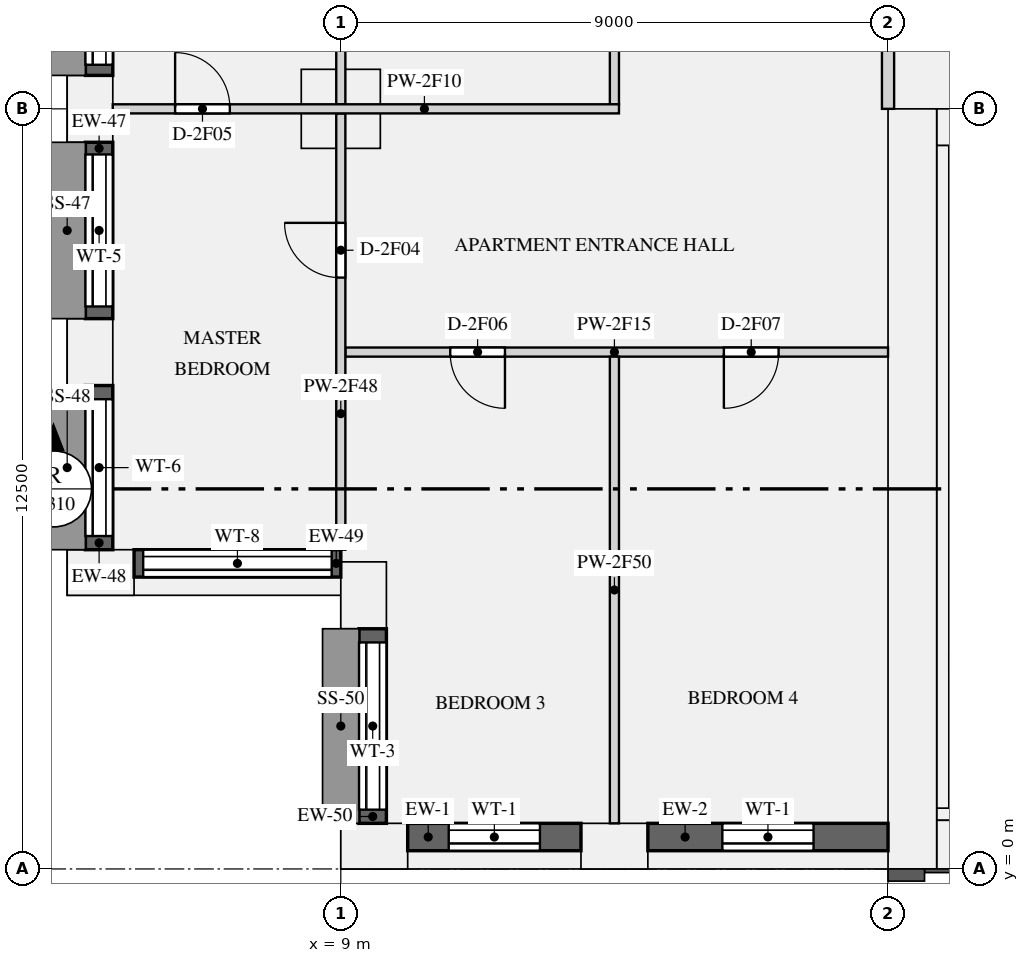
"""IFC4 building model, lengths in metres.
Left out: names, types, materials, properties, quantities, classifications, styles, units other than length and angle.
Written with IfcOpenShell. Run it as: python <this file> out.ifc"""

import sys

from ifc_helpers import new_model, si_unit, direction, frame, frame_2d, origin, origin_2d, place, context, subcontext, project, spatial, rectangle, extrude, element, fill, save


model = new_model("IFC4")
c1 = context("Model", 3, precision=1e-05, world=origin(), true_north=direction((0.0, 1.0)))
c2 = subcontext(c1, "Body", "Model", "MODEL_VIEW")
j1 = project(units=[si_unit("LENGTHUNIT", "METRE"), si_unit("PLANEANGLEUNIT", "RADIAN")], contexts=[c1])
p1 = place(None, origin())
s1 = spatial("IfcSite", under=j1, at=p1, CompositionType="ELEMENT")
p2 = place(p1, origin())
s2 = spatial("IfcBuilding", under=s1, at=p2, CompositionType="ELEMENT")
p3 = place(p2, frame((0.0, 0.0, 127.65)))
s3 = spatial("IfcBuildingStorey", under=s2, at=p3, CompositionType="ELEMENT", Elevation=127.65)
for number, where, z_axis, x_axis in (
    (1, (9.55, 0.375, 0.0), (0.0, 0.0, 1.0), (1.0, 0.0, 0.0)),
    (2, (13.5, 0.375, 0.0), (0.0, 0.0, 1.0), (1.0, 0.0, 0.0)),
    (3, (4.875, 12.5, 0.0), (0.0, 0.0, 1.0), (0.0, -1.0, 0.0)),
    (4, (4.875, 8.5, 0.0), (0.0, 0.0, 1.0), (0.0, -1.0, 0.0)),
    (5, (5.05, 4.875, 0.0), (0.0, 0.0, 1.0), (1.0, 0.0, 0.0)),
    (6, (9.375, 4.5, 0.0), (0.0, 0.0, 1.0), (0.0, -1.0, 0.0)),
):
    element("IfcColumn", number, at=place(p3, frame(where, z_axis=z_axis, x_axis=x_axis)), inside=s3, PredefinedType="USERDEFINED", context=c2, shape_type="SweptSolid", body=[
        extrude(rectangle(XDim=1.1, YDim=0.75, at=origin_2d()), origin(), (0.0, 0.0, 1.0), 3.15),
    ])
p4 = place(p3, frame((9.0, 12.5, 0.0), z_axis=(0.0, 0.0, 1.0), x_axis=(1.0, 0.0, 0.0)))
e7 = element("IfcColumn", 7, at=p4, inside=s3, PredefinedType="COLUMN", context=c2, shape_type="SweptSolid", body=[
    extrude(rectangle(XDim=1.3, YDim=1.3, at=origin_2d()), origin(), (0.0, 0.0, 1.0), 3.15),
])
p5 = place(p3, frame((18.4, 0.0, 0.0), z_axis=(0.0, 0.0, 1.0), x_axis=(0.0, 1.0, 0.0)))
e8 = element("IfcWall", 8, at=p5, inside=s3, PredefinedType="SHEAR", context=c2, shape_type="SweptSolid", body=[
    extrude(rectangle(XDim=12.5, YDim=0.8, at=frame_2d((6.25, 0.0))), origin(), (0.0, 0.0, 1.0), 3.15),
])
p6 = place(p3, frame((18.8, 0.4, 0.0), z_axis=(0.0, 0.0, 1.0), x_axis=(1.0, 0.0, 0.0)))
e9 = element("IfcWall", 9, at=p6, inside=s3, PredefinedType="SHEAR", context=c2, shape_type="SweptSolid", body=[
    extrude(rectangle(XDim=34.4, YDim=0.8, at=frame_2d((17.2, 0.0))), origin(), (0.0, 0.0, 1.0), 3.15),
])
p7 = place(p3, frame((18.8, 12.2, 0.0), z_axis=(0.0, 0.0, 1.0), x_axis=(1.0, 0.0, 0.0)))
e10 = element("IfcWall", 10, at=p7, inside=s3, PredefinedType="SHEAR", context=c2, shape_type="SweptSolid", body=[
    extrude(rectangle(XDim=34.4, YDim=0.6, at=frame_2d((17.2, 0.0))), origin(), (0.0, 0.0, 1.0), 3.15),
])
p8 = place(p7, frame((24.375, 0.0, 0.0)))
e11 = element("IfcOpeningElement", 11, at=p8, cuts=e10, PredefinedType="OPENING", context=c2, shape_type="SweptSolid", body=[
    extrude(rectangle(XDim=1.1, YDim=2.1, at=frame_2d((0.55, 1.05))), frame((0.0, 0.31, 0.0), z_axis=(0.0, -1.0, 0.0), x_axis=(1.0, 0.0, 0.0)), (0.0, 0.0, 1.0), 0.62),
])
p9 = place(p7, frame((26.625, 0.0, 0.0)))
e12 = element("IfcOpeningElement", 12, at=p9, cuts=e10, PredefinedType="OPENING", context=c2, shape_type="SweptSolid", body=[
    extrude(rectangle(XDim=1.1, YDim=2.1, at=frame_2d((0.55, 1.05))), frame((0.0, 0.31, 0.0), z_axis=(0.0, -1.0, 0.0), x_axis=(1.0, 0.0, 0.0)), (0.0, 0.0, 1.0), 0.62),
])
p10 = place(p7, frame((28.875, 0.0, 0.0)))
e13 = element("IfcOpeningElement", 13, at=p10, cuts=e10, PredefinedType="OPENING", context=c2, shape_type="SweptSolid", body=[
    extrude(rectangle(XDim=1.1, YDim=2.1, at=frame_2d((0.55, 1.05))), frame((0.0, 0.31, 0.0), z_axis=(0.0, -1.0, 0.0), x_axis=(1.0, 0.0, 0.0)), (0.0, 0.0, 1.0), 0.62),
])
p11 = place(p7, frame((4.75, 0.0, 0.0)))
e14 = element("IfcOpeningElement", 14, at=p11, cuts=e10, PredefinedType="OPENING", context=c2, shape_type="SweptSolid", body=[
    extrude(rectangle(XDim=0.9, YDim=2.1, at=frame_2d((0.45, 1.05))), frame((0.0, 0.31, 0.0), z_axis=(0.0, -1.0, 0.0), x_axis=(1.0, 0.0, 0.0)), (0.0, 0.0, 1.0), 0.62),
])
p12 = place(p7, frame((11.75, 0.0, 0.0)))
e15 = element("IfcOpeningElement", 15, at=p12, cuts=e10, PredefinedType="OPENING", context=c2, shape_type="SweptSolid", body=[
    extrude(rectangle(XDim=0.9, YDim=2.1, at=frame_2d((0.45, 1.05))), frame((0.0, 0.31, 0.0), z_axis=(0.0, -1.0, 0.0), x_axis=(1.0, 0.0, 0.0)), (0.0, 0.0, 1.0), 0.62),
])
p13 = place(p7, frame((18.25, 0.0, 0.0)))
e16 = element("IfcOpeningElement", 16, at=p13, cuts=e10, PredefinedType="OPENING", context=c2, shape_type="SweptSolid", body=[
    extrude(rectangle(XDim=0.9, YDim=2.1, at=frame_2d((0.45, 1.05))), frame((0.0, 0.31, 0.0), z_axis=(0.0, -1.0, 0.0), x_axis=(1.0, 0.0, 0.0)), (0.0, 0.0, 1.0), 0.62),
])
p14 = place(p7, frame((1.35, 0.0, 0.0)))
e17 = element("IfcOpeningElement", 17, at=p14, cuts=e10, PredefinedType="OPENING", context=c2, shape_type="SweptSolid", body=[
    extrude(rectangle(XDim=1.2, YDim=2.1, at=frame_2d((0.6, 1.05))), frame((0.0, 0.31, 0.0), z_axis=(0.0, -1.0, 0.0), x_axis=(1.0, 0.0, 0.0)), (0.0, 0.0, 1.0), 0.62),
])
p15 = place(p7, frame((31.85, 0.0, 0.0)))
e18 = element("IfcOpeningElement", 18, at=p15, cuts=e10, PredefinedType="OPENING", context=c2, shape_type="SweptSolid", body=[
    extrude(rectangle(XDim=1.2, YDim=2.1, at=frame_2d((0.6, 1.05))), frame((0.0, 0.31, 0.0), z_axis=(0.0, -1.0, 0.0), x_axis=(1.0, 0.0, 0.0)), (0.0, 0.0, 1.0), 0.62),
])
p16 = place(p3, frame((18.9, 1.0, 0.0), z_axis=(0.0, 0.0, 1.0), x_axis=(0.0, 1.0, 0.0)))
e19 = element("IfcWall", 19, at=p16, inside=s3, PredefinedType="SHEAR", context=c2, shape_type="SweptSolid", body=[
    extrude(rectangle(XDim=10.9, YDim=0.2, at=frame_2d((5.45, 0.0))), origin(), (0.0, 0.0, 1.0), 3.15),
])
p17 = place(p3, frame((18.8, 0.9, 0.0), z_axis=(0.0, 0.0, 1.0), x_axis=(1.0, 0.0, 0.0)))
e20 = element("IfcWall", 20, at=p17, inside=s3, PredefinedType="SHEAR", context=c2, shape_type="SweptSolid", body=[
    extrude(rectangle(XDim=34.4, YDim=0.2, at=frame_2d((17.2, 0.0))), origin(), (0.0, 0.0, 1.0), 3.15),
])
p18 = place(p3, frame((19.0, 3.4, 0.0), z_axis=(0.0, 0.0, 1.0), x_axis=(1.0, 0.0, 0.0)))
e21 = element("IfcWall", 21, at=p18, inside=s3, PredefinedType="SHEAR", context=c2, shape_type="SweptSolid", body=[
    extrude(rectangle(XDim=2.55, YDim=0.3, at=frame_2d((1.275, 0.0))), origin(), (0.0, 0.0, 1.0), 3.15),
])
p19 = place(p18, frame((0.675, 0.0, 0.0)))
e22 = element("IfcOpeningElement", 22, at=p19, cuts=e21, PredefinedType="OPENING", context=c2, shape_type="SweptSolid", body=[
    extrude(rectangle(XDim=1.2, YDim=2.1, at=frame_2d((0.6, 1.05))), frame((0.0, 0.16, 0.0), z_axis=(0.0, -1.0, 0.0), x_axis=(1.0, 0.0, 0.0)), (0.0, 0.0, 1.0), 0.32),
])
p20 = place(p3, frame((10.1, 0.525, 0.9), z_axis=(0.0, 0.0, 1.0), x_axis=(1.0, 0.0, 0.0)))
e23 = element("IfcWall", 23, at=p20, inside=s3, PredefinedType="SOLIDWALL", context=c2, shape_type="SweptSolid", body=[
    extrude(rectangle(XDim=2.85, YDim=0.45, at=frame_2d((1.425, 0.0))), origin(), (0.0, 0.0, 1.0), 1.75),
])
p21 = place(p20, frame((0.675, 0.0, 0.15)))
e24 = element("IfcOpeningElement", 24, at=p21, cuts=e23, PredefinedType="OPENING", context=c2, shape_type="SweptSolid", body=[
    extrude(rectangle(XDim=1.5, YDim=1.5, at=frame_2d((0.75, 0.75))), frame((0.0, 0.235, 0.0), z_axis=(0.0, -1.0, 0.0), x_axis=(1.0, 0.0, 0.0)), (0.0, 0.0, 1.0), 0.47),
])
p22 = place(p3, frame((14.05, 0.525, 0.9), z_axis=(0.0, 0.0, 1.0), x_axis=(1.0, 0.0, 0.0)))
e25 = element("IfcWall", 25, at=p22, inside=s3, PredefinedType="SOLIDWALL", context=c2, shape_type="SweptSolid", body=[
    extrude(rectangle(XDim=3.95, YDim=0.45, at=frame_2d((1.975, 0.0))), origin(), (0.0, 0.0, 1.0), 1.75),
])
p23 = place(p22, frame((1.225, 0.0, 0.15)))
e26 = element("IfcOpeningElement", 26, at=p23, cuts=e25, PredefinedType="OPENING", context=c2, shape_type="SweptSolid", body=[
    extrude(rectangle(XDim=1.5, YDim=1.5, at=frame_2d((0.75, 0.75))), frame((0.0, 0.235, 0.0), z_axis=(0.0, -1.0, 0.0), x_axis=(1.0, 0.0, 0.0)), (0.0, 0.0, 1.0), 0.47),
])
p24 = place(p3, frame((5.025, 15.4, 0.9), z_axis=(0.0, 0.0, 1.0), x_axis=(0.0, -1.0, 0.0)))
e27 = element("IfcWall", 27, at=p24, inside=s3, PredefinedType="SOLIDWALL", context=c2, shape_type="SweptSolid", body=[
    extrude(rectangle(XDim=2.35, YDim=0.45, at=frame_2d((1.175, 0.0))), origin(), (0.0, 0.0, 1.0), 1.75),
])
p25 = place(p24, frame((0.175, 0.0, 0.15)))
e28 = element("IfcOpeningElement", 28, at=p25, cuts=e27, PredefinedType="OPENING", context=c2, shape_type="SweptSolid", body=[
    extrude(rectangle(XDim=2.0, YDim=1.5, at=frame_2d((1.0, 0.75))), frame((0.0, 0.235, 0.0), z_axis=(0.0, -1.0, 0.0), x_axis=(1.0, 0.0, 0.0)), (0.0, 0.0, 1.0), 0.47),
])
p26 = place(p3, frame((5.025, 11.95, 0.9), z_axis=(0.0, 0.0, 1.0), x_axis=(0.0, -1.0, 0.0)))
e29 = element("IfcWall", 29, at=p26, inside=s3, PredefinedType="SOLIDWALL", context=c2, shape_type="SweptSolid", body=[
    extrude(rectangle(XDim=2.9, YDim=0.45, at=frame_2d((1.45, 0.0))), origin(), (0.0, 0.0, 1.0), 1.75),
])
p27 = place(p26, frame((0.2, 0.0, 0.15)))
e30 = element("IfcOpeningElement", 30, at=p27, cuts=e29, PredefinedType="OPENING", context=c2, shape_type="SweptSolid", body=[
    extrude(rectangle(XDim=2.5, YDim=1.5, at=frame_2d((1.25, 0.75))), frame((0.0, 0.235, 0.0), z_axis=(0.0, -1.0, 0.0), x_axis=(1.0, 0.0, 0.0)), (0.0, 0.0, 1.0), 0.47),
])
p28 = place(p3, frame((5.025, 7.95, 0.9), z_axis=(0.0, 0.0, 1.0), x_axis=(0.0, -1.0, 0.0)))
e31 = element("IfcWall", 31, at=p28, inside=s3, PredefinedType="SOLIDWALL", context=c2, shape_type="SweptSolid", body=[
    extrude(rectangle(XDim=2.7, YDim=0.45, at=frame_2d((1.35, 0.0))), origin(), (0.0, 0.0, 1.0), 1.75),
])
p29 = place(p28, frame((0.225, 0.0, 0.15)))
e32 = element("IfcOpeningElement", 32, at=p29, cuts=e31, PredefinedType="OPENING", context=c2, shape_type="SweptSolid", body=[
    extrude(rectangle(XDim=2.25, YDim=1.5, at=frame_2d((1.125, 0.75))), frame((0.0, 0.235, 0.0), z_axis=(0.0, -1.0, 0.0), x_axis=(1.0, 0.0, 0.0)), (0.0, 0.0, 1.0), 0.47),
])
p30 = place(p3, frame((5.6, 5.025, 0.9), z_axis=(0.0, 0.0, 1.0), x_axis=(1.0, 0.0, 0.0)))
e33 = element("IfcWall", 33, at=p30, inside=s3, PredefinedType="SOLIDWALL", context=c2, shape_type="SweptSolid", body=[
    extrude(rectangle(XDim=3.4, YDim=0.45, at=frame_2d((1.7, 0.0))), origin(), (0.0, 0.0, 1.0), 1.75),
])
p31 = place(p30, frame((0.15, 0.0, 0.15)))
e34 = element("IfcOpeningElement", 34, at=p31, cuts=e33, PredefinedType="OPENING", context=c2, shape_type="SweptSolid", body=[
    extrude(rectangle(XDim=3.1, YDim=1.5, at=frame_2d((1.55, 0.75))), frame((0.0, 0.235, 0.0), z_axis=(0.0, -1.0, 0.0), x_axis=(1.0, 0.0, 0.0)), (0.0, 0.0, 1.0), 0.47),
])
p32 = place(p3, frame((9.525, 3.95, 0.9), z_axis=(0.0, 0.0, 1.0), x_axis=(0.0, -1.0, 0.0)))
e35 = element("IfcWall", 35, at=p32, inside=s3, PredefinedType="SOLIDWALL", context=c2, shape_type="SweptSolid", body=[
    extrude(rectangle(XDim=3.2, YDim=0.45, at=frame_2d((1.6, 0.0))), origin(), (0.0, 0.0, 1.0), 1.75),
])
p33 = place(p32, frame((0.225, 0.0, 0.15)))
e36 = element("IfcOpeningElement", 36, at=p33, cuts=e35, PredefinedType="OPENING", context=c2, shape_type="SweptSolid", body=[
    extrude(rectangle(XDim=2.75, YDim=1.5, at=frame_2d((1.375, 0.75))), frame((0.0, 0.235, 0.0), z_axis=(0.0, -1.0, 0.0), x_axis=(1.0, 0.0, 0.0)), (0.0, 0.0, 1.0), 0.47),
])
p34 = place(p3, frame((18.0, 12.5, 0.0), z_axis=(0.0, 0.0, 1.0), x_axis=(0.0, 1.0, 0.0)))
e37 = element("IfcWall", 37, at=p34, inside=s3, PredefinedType="PARTITIONING", context=c2, shape_type="SweptSolid", body=[
    extrude(rectangle(XDim=3.4, YDim=0.2, at=frame_2d((1.7, 0.0))), origin(), (0.0, 0.0, 1.0), 2.65),
])
p35 = place(p3, frame((5.25, 12.5, 0.0), z_axis=(0.0, 0.0, 1.0), x_axis=(1.0, 0.0, 0.0)))
e38 = element("IfcWall", 38, at=p35, inside=s3, PredefinedType="PARTITIONING", context=c2, shape_type="SweptSolid", body=[
    extrude(rectangle(XDim=8.325, YDim=0.15, at=frame_2d((4.163, 0.0))), origin(), (0.0, 0.0, 1.0), 2.65),
])
p36 = place(p35, frame((1.025, 0.0, 0.0)))
e39 = element("IfcOpeningElement", 39, at=p36, cuts=e38, PredefinedType="OPENING", context=c2, shape_type="SweptSolid", body=[
    extrude(rectangle(XDim=0.9, YDim=2.1, at=frame_2d((0.45, 1.05))), frame((0.0, 0.085, 0.0), z_axis=(0.0, -1.0, 0.0), x_axis=(1.0, 0.0, 0.0)), (0.0, 0.0, 1.0), 0.17),
])
p37 = place(p3, frame((9.075, 8.5, 0.0), z_axis=(0.0, 0.0, 1.0), x_axis=(1.0, 0.0, 0.0)))
e40 = element("IfcWall", 40, at=p37, inside=s3, PredefinedType="PARTITIONING", context=c2, shape_type="SweptSolid", body=[
    extrude(rectangle(XDim=8.925, YDim=0.15, at=frame_2d((4.462, 0.0))), origin(), (0.0, 0.0, 1.0), 2.65),
])
p38 = place(p37, frame((1.725, 0.0, 0.0)))
e41 = element("IfcOpeningElement", 41, at=p38, cuts=e40, PredefinedType="OPENING", context=c2, shape_type="SweptSolid", body=[
    extrude(rectangle(XDim=0.9, YDim=2.1, at=frame_2d((0.45, 1.05))), frame((0.0, 0.085, 0.0), z_axis=(0.0, -1.0, 0.0), x_axis=(1.0, 0.0, 0.0)), (0.0, 0.0, 1.0), 0.17),
])
p39 = place(p37, frame((6.225, 0.0, 0.0)))
e42 = element("IfcOpeningElement", 42, at=p39, cuts=e40, PredefinedType="OPENING", context=c2, shape_type="SweptSolid", body=[
    extrude(rectangle(XDim=0.9, YDim=2.1, at=frame_2d((0.45, 1.05))), frame((0.0, 0.085, 0.0), z_axis=(0.0, -1.0, 0.0), x_axis=(1.0, 0.0, 0.0)), (0.0, 0.0, 1.0), 0.17),
])
p40 = place(p3, frame((9.0, 5.25, 0.0), z_axis=(0.0, 0.0, 1.0), x_axis=(0.0, 1.0, 0.0)))
e43 = element("IfcWall", 43, at=p40, inside=s3, PredefinedType="PARTITIONING", context=c2, shape_type="SweptSolid", body=[
    extrude(rectangle(XDim=7.175, YDim=0.15, at=frame_2d((3.587, 0.0))), origin(), (0.0, 0.0, 1.0), 2.65),
])
p41 = place(p40, frame((4.475, 0.0, 0.0)))
e44 = element("IfcOpeningElement", 44, at=p41, cuts=e43, PredefinedType="OPENING", context=c2, shape_type="SweptSolid", body=[
    extrude(rectangle(XDim=0.9, YDim=2.1, at=frame_2d((0.45, 1.05))), frame((0.0, 0.085, 0.0), z_axis=(0.0, -1.0, 0.0), x_axis=(1.0, 0.0, 0.0)), (0.0, 0.0, 1.0), 0.17),
])
p42 = place(p3, frame((9.0, 12.575, 0.0), z_axis=(0.0, 0.0, 1.0), x_axis=(0.0, 1.0, 0.0)))
e45 = element("IfcWall", 45, at=p42, inside=s3, PredefinedType="PARTITIONING", context=c2, shape_type="SweptSolid", body=[
    extrude(rectangle(XDim=3.85, YDim=0.15, at=frame_2d((1.925, 0.0))), origin(), (0.0, 0.0, 1.0), 2.65),
])
p43 = place(p3, frame((13.5, 0.75, 0.0), z_axis=(0.0, 0.0, 1.0), x_axis=(0.0, 1.0, 0.0)))
e46 = element("IfcWall", 46, at=p43, inside=s3, PredefinedType="PARTITIONING", context=c2, shape_type="SweptSolid", body=[
    extrude(rectangle(XDim=7.675, YDim=0.15, at=frame_2d((3.837, 0.0))), origin(), (0.0, 0.0, 1.0), 2.65),
])
p44 = place(p3, frame((13.5, 12.575, 0.0), z_axis=(0.0, 0.0, 1.0), x_axis=(0.0, 1.0, 0.0)))
e47 = element("IfcWall", 47, at=p44, inside=s3, PredefinedType="PARTITIONING", context=c2, shape_type="SweptSolid", body=[
    extrude(rectangle(XDim=10.325, YDim=0.15, at=frame_2d((5.163, 0.0))), origin(), (0.0, 0.0, 1.0), 2.65),
])
p45 = place(p44, frame((1.475, 0.0, 0.0)))
e48 = element("IfcOpeningElement", 48, at=p45, cuts=e47, PredefinedType="OPENING", context=c2, shape_type="SweptSolid", body=[
    extrude(rectangle(XDim=0.9, YDim=2.1, at=frame_2d((0.45, 1.05))), frame((0.0, 0.085, 0.0), z_axis=(0.0, -1.0, 0.0), x_axis=(1.0, 0.0, 0.0)), (0.0, 0.0, 1.0), 0.17),
])
p46 = place(p44, frame((6.45, 0.0, 0.0)))
e49 = element("IfcOpeningElement", 49, at=p46, cuts=e47, PredefinedType="OPENING", context=c2, shape_type="SweptSolid", body=[
    extrude(rectangle(XDim=1.5, YDim=2.1, at=frame_2d((0.75, 1.05))), frame((0.0, 0.085, 0.0), z_axis=(0.0, -1.0, 0.0), x_axis=(1.0, 0.0, 0.0)), (0.0, 0.0, 1.0), 0.17),
])
p47 = place(p21, origin())
e50 = element("IfcWindow", 50, at=p47, inside=s3, PartitioningType="SINGLE_PANEL", PredefinedType="WINDOW", context=c2, shape_type="SweptSolid", body=[
    extrude(rectangle(XDim=1.5, YDim=1.5, at=frame_2d((0.75, 0.75))), frame((0.0, -0.065, 0.0), z_axis=(0.0, -1.0, 0.0), x_axis=(1.0, 0.0, 0.0)), (0.0, 0.0, 1.0), 0.06),
])
fill(e24, e50)
p48 = place(p23, origin())
e51 = element("IfcWindow", 51, at=p48, inside=s3, PartitioningType="SINGLE_PANEL", PredefinedType="WINDOW", context=c2, shape_type="SweptSolid", body=[
    extrude(rectangle(XDim=1.5, YDim=1.5, at=frame_2d((0.75, 0.75))), frame((0.0, -0.065, 0.0), z_axis=(0.0, -1.0, 0.0), x_axis=(1.0, 0.0, 0.0)), (0.0, 0.0, 1.0), 0.06),
])
fill(e26, e51)
p49 = place(p25, origin())
e52 = element("IfcWindow", 52, at=p49, inside=s3, PartitioningType="SINGLE_PANEL", PredefinedType="WINDOW", context=c2, shape_type="SweptSolid", body=[
    extrude(rectangle(XDim=2.0, YDim=1.5, at=frame_2d((1.0, 0.75))), frame((0.0, -0.065, 0.0), z_axis=(0.0, -1.0, 0.0), x_axis=(1.0, 0.0, 0.0)), (0.0, 0.0, 1.0), 0.06),
])
fill(e28, e52)
p50 = place(p27, origin())
e53 = element("IfcWindow", 53, at=p50, inside=s3, PartitioningType="SINGLE_PANEL", PredefinedType="WINDOW", context=c2, shape_type="SweptSolid", body=[
    extrude(rectangle(XDim=2.5, YDim=1.5, at=frame_2d((1.25, 0.75))), frame((0.0, -0.065, 0.0), z_axis=(0.0, -1.0, 0.0), x_axis=(1.0, 0.0, 0.0)), (0.0, 0.0, 1.0), 0.06),
])
fill(e30, e53)
p51 = place(p29, origin())
e54 = element("IfcWindow", 54, at=p51, inside=s3, PartitioningType="SINGLE_PANEL", PredefinedType="WINDOW", context=c2, shape_type="SweptSolid", body=[
    extrude(rectangle(XDim=2.25, YDim=1.5, at=frame_2d((1.125, 0.75))), frame((0.0, -0.065, 0.0), z_axis=(0.0, -1.0, 0.0), x_axis=(1.0, 0.0, 0.0)), (0.0, 0.0, 1.0), 0.06),
])
fill(e32, e54)
p52 = place(p31, origin())
e55 = element("IfcWindow", 55, at=p52, inside=s3, PartitioningType="SINGLE_PANEL", PredefinedType="WINDOW", context=c2, shape_type="SweptSolid", body=[
    extrude(rectangle(XDim=3.1, YDim=1.5, at=frame_2d((1.55, 0.75))), frame((0.0, -0.065, 0.0), z_axis=(0.0, -1.0, 0.0), x_axis=(1.0, 0.0, 0.0)), (0.0, 0.0, 1.0), 0.06),
])
fill(e34, e55)
p53 = place(p33, origin())
e56 = element("IfcWindow", 56, at=p53, inside=s3, PartitioningType="SINGLE_PANEL", PredefinedType="WINDOW", context=c2, shape_type="SweptSolid", body=[
    extrude(rectangle(XDim=2.75, YDim=1.5, at=frame_2d((1.375, 0.75))), frame((0.0, -0.065, 0.0), z_axis=(0.0, -1.0, 0.0), x_axis=(1.0, 0.0, 0.0)), (0.0, 0.0, 1.0), 0.06),
])
fill(e36, e56)
p54 = place(p41, origin())
e57 = element("IfcDoor", 57, at=p54, inside=s3, OperationType="SINGLE_SWING_RIGHT", PredefinedType="DOOR", context=c2, shape_type="SweptSolid", body=[
    extrude(rectangle(XDim=0.9, YDim=2.1, at=frame_2d((0.45, 1.05))), frame((0.0, 0.025, 0.0), z_axis=(0.0, -1.0, 0.0), x_axis=(1.0, 0.0, 0.0)), (0.0, 0.0, 1.0), 0.05),
])
fill(e44, e57)
p55 = place(p36, origin())
e58 = element("IfcDoor", 58, at=p55, inside=s3, OperationType="SINGLE_SWING_LEFT", PredefinedType="DOOR", context=c2, shape_type="SweptSolid", body=[
    extrude(rectangle(XDim=0.9, YDim=2.1, at=frame_2d((0.45, 1.05))), frame((0.0, 0.025, 0.0), z_axis=(0.0, -1.0, 0.0), x_axis=(1.0, 0.0, 0.0)), (0.0, 0.0, 1.0), 0.05),
])
fill(e39, e58)
p56 = place(p38, frame((0.9, 0.0, 0.0), z_axis=(0.0, 0.0, 1.0), x_axis=(-1.0, 0.0, 0.0)))
e59 = element("IfcDoor", 59, at=p56, inside=s3, OperationType="SINGLE_SWING_LEFT", PredefinedType="DOOR", context=c2, shape_type="SweptSolid", body=[
    extrude(rectangle(XDim=0.9, YDim=2.1, at=frame_2d((0.45, 1.05))), frame((0.0, 0.025, 0.0), z_axis=(0.0, -1.0, 0.0), x_axis=(1.0, 0.0, 0.0)), (0.0, 0.0, 1.0), 0.05),
])
fill(e41, e59)
p57 = place(p39, frame((0.9, 0.0, 0.0), z_axis=(0.0, 0.0, 1.0), x_axis=(-1.0, 0.0, 0.0)))
e60 = element("IfcDoor", 60, at=p57, inside=s3, OperationType="SINGLE_SWING_RIGHT", PredefinedType="DOOR", context=c2, shape_type="SweptSolid", body=[
    extrude(rectangle(XDim=0.9, YDim=2.1, at=frame_2d((0.45, 1.05))), frame((0.0, 0.025, 0.0), z_axis=(0.0, -1.0, 0.0), x_axis=(1.0, 0.0, 0.0)), (0.0, 0.0, 1.0), 0.05),
])
fill(e42, e60)
save(model, sys.argv[1])
